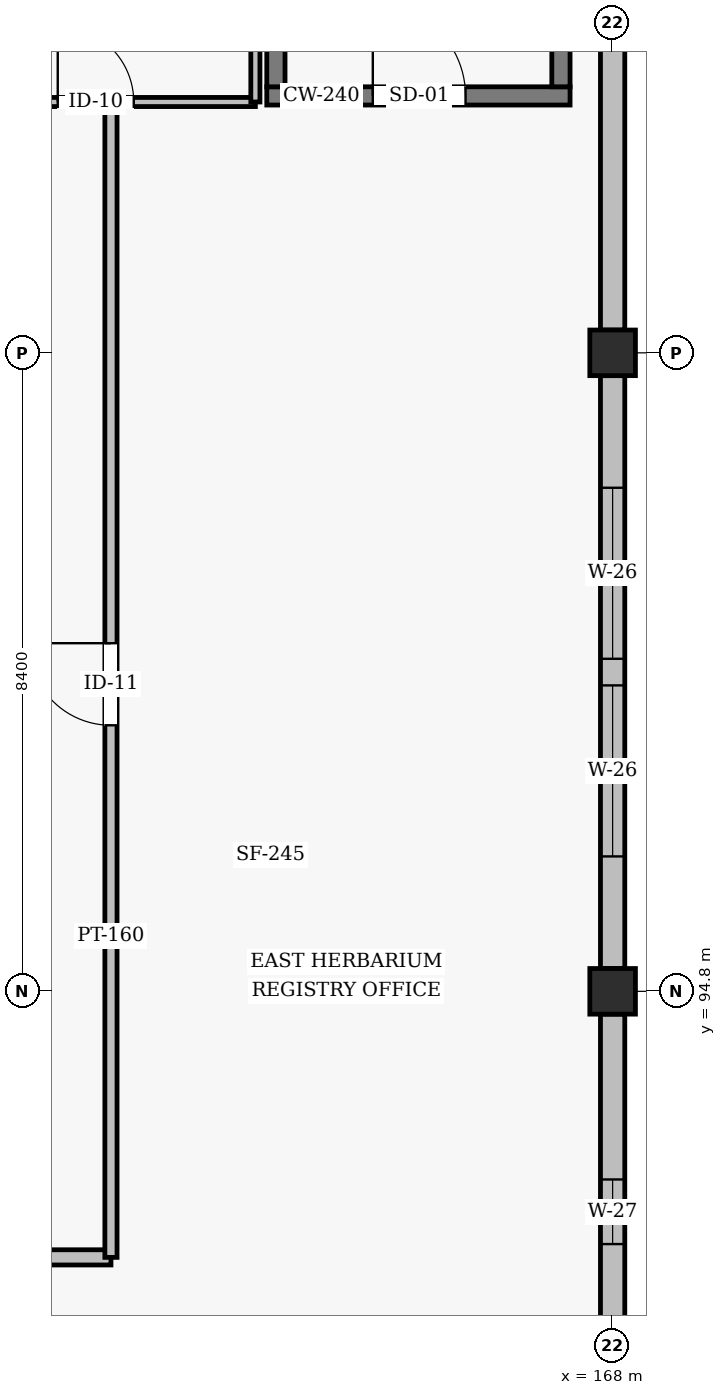
"""IFC4 building model, lengths in metres.
Left out: names, types, materials, properties, quantities, classifications, styles, units other than length and angle.
Written with IfcOpenShell. Run it as: python <this file> out.ifc"""

import sys

from ifc_helpers import new_model, si_unit, direction, frame, frame_2d, origin, origin_2d, place, context, subcontext, project, spatial, rectangle, hollow_rectangle, extrude, element, fill, save


model = new_model("IFC4")
c1 = context("Model", 3, precision=1e-05, world=origin(), true_north=direction((0.0, 1.0)))
c2 = subcontext(c1, "Body", "Model", "MODEL_VIEW")
j1 = project(units=[si_unit("LENGTHUNIT", "METRE"), si_unit("PLANEANGLEUNIT", "RADIAN")], contexts=[c1])
p1 = place(None, origin())
s1 = spatial("IfcSite", under=j1, at=p1, CompositionType="ELEMENT")
p2 = place(p1, origin())
s2 = spatial("IfcBuilding", under=s1, at=p2, CompositionType="ELEMENT")
p3 = place(p2, frame((0.0, 0.0, 9.0)))
s3 = spatial("IfcBuildingStorey", under=s2, at=p3, CompositionType="ELEMENT", Elevation=9.0)
for number, where, z_axis, x_axis in (
    (1, (168.0, 94.8, 0.0), (0.0, 0.0, 1.0), (1.0, 0.0, 0.0)),
    (2, (168.0, 103.2, 0.0), (0.0, 0.0, 1.0), (1.0, 0.0, 0.0)),
):
    element("IfcColumn", number, at=place(p3, frame(where, z_axis=z_axis, x_axis=x_axis)), inside=s3, PredefinedType="COLUMN", context=c2, shape_type="SweptSolid", body=[
        extrude(hollow_rectangle(XDim=0.6, YDim=0.6, WallThickness=0.025, InnerFilletRadius=0.025, OuterFilletRadius=0.05, at=origin_2d()), origin(), (0.0, 0.0, 1.0), 4.2),
    ])
p4 = place(p3, frame((168.0, 86.7, 0.0), z_axis=(0.0, 0.0, 1.0), x_axis=(0.0, 1.0, 0.0)))
e3 = element("IfcWall", 3, at=p4, inside=s3, PredefinedType="SOLIDWALL", context=c2, shape_type="SweptSolid", body=[
    extrude(rectangle(XDim=7.8, YDim=0.32, at=frame_2d((3.9, 0.0))), origin(), (0.0, 0.0, 1.0), 3.435),
])
p5 = place(p4, frame((2.175, 0.0, 1.1)))
e4 = element("IfcOpeningElement", 4, at=p5, cuts=e3, PredefinedType="OPENING", context=c2, shape_type="SweptSolid", body=[
    extrude(rectangle(XDim=0.85, YDim=1.45, at=frame_2d((0.425, 0.725))), frame((0.0, 0.17, 0.0), z_axis=(0.0, -1.0, 0.0), x_axis=(1.0, 0.0, 0.0)), (0.0, 0.0, 1.0), 0.34),
])
p6 = place(p4, frame((4.775, 0.0, 1.1)))
e5 = element("IfcOpeningElement", 5, at=p6, cuts=e3, PredefinedType="OPENING", context=c2, shape_type="SweptSolid", body=[
    extrude(rectangle(XDim=0.85, YDim=1.45, at=frame_2d((0.425, 0.725))), frame((0.0, 0.17, 0.0), z_axis=(0.0, -1.0, 0.0), x_axis=(1.0, 0.0, 0.0)), (0.0, 0.0, 1.0), 0.34),
])
p7 = place(p3, frame((168.0, 95.1, 0.0), z_axis=(0.0, 0.0, 1.0), x_axis=(0.0, 1.0, 0.0)))
e6 = element("IfcWall", 6, at=p7, inside=s3, PredefinedType="SOLIDWALL", context=c2, shape_type="SweptSolid", body=[
    extrude(rectangle(XDim=7.8, YDim=0.32, at=frame_2d((3.9, 0.0))), origin(), (0.0, 0.0, 1.0), 3.435),
])
p8 = place(p7, frame((1.475, 0.0, 0.8)))
e7 = element("IfcOpeningElement", 7, at=p8, cuts=e6, PredefinedType="OPENING", context=c2, shape_type="SweptSolid", body=[
    extrude(rectangle(XDim=2.25, YDim=2.15, at=frame_2d((1.125, 1.075))), frame((0.0, 0.17, 0.0), z_axis=(0.0, -1.0, 0.0), x_axis=(1.0, 0.0, 0.0)), (0.0, 0.0, 1.0), 0.34),
])
p9 = place(p7, frame((4.075, 0.0, 0.8)))
e8 = element("IfcOpeningElement", 8, at=p9, cuts=e6, PredefinedType="OPENING", context=c2, shape_type="SweptSolid", body=[
    extrude(rectangle(XDim=2.25, YDim=2.15, at=frame_2d((1.125, 1.075))), frame((0.0, 0.17, 0.0), z_axis=(0.0, -1.0, 0.0), x_axis=(1.0, 0.0, 0.0)), (0.0, 0.0, 1.0), 0.34),
])
p10 = place(p3, frame((168.0, 103.5, 0.0), z_axis=(0.0, 0.0, 1.0), x_axis=(0.0, 1.0, 0.0)))
e9 = element("IfcWall", 9, at=p10, inside=s3, PredefinedType="SOLIDWALL", context=c2, shape_type="SweptSolid", body=[
    extrude(rectangle(XDim=11.35, YDim=0.32, at=frame_2d((5.675, 0.0))), origin(), (0.0, 0.0, 1.0), 3.143),
])
p11 = place(p3, frame((163.45, 106.58, 0.0), z_axis=(0.0, 0.0, 1.0), x_axis=(1.0, 0.0, 0.0)))
e10 = element("IfcWall", 10, at=p11, inside=s3, PredefinedType="SHEAR", context=c2, shape_type="SweptSolid", body=[
    extrude(rectangle(XDim=3.99, YDim=0.24, at=frame_2d((1.995, 0.0))), origin(), (0.0, 0.0, 1.0), 3.935),
])
p12 = place(p11, frame((1.395, 0.0, 0.0)))
e11 = element("IfcOpeningElement", 11, at=p12, cuts=e10, PredefinedType="OPENING", context=c2, shape_type="SweptSolid", body=[
    extrude(rectangle(XDim=1.22, YDim=2.18, at=frame_2d((0.61, 1.09))), frame((0.0, 0.13, 0.0), z_axis=(0.0, -1.0, 0.0), x_axis=(1.0, 0.0, 0.0)), (0.0, 0.0, 1.0), 0.26),
])
for number, where, z_axis, x_axis in (
    (12, (163.57, 106.7, 0.0), (0.0, 0.0, 1.0), (0.0, 1.0, 0.0)),
    (13, (167.32, 106.7, 0.0), (0.0, 0.0, 1.0), (0.0, 1.0, 0.0)),
):
    element("IfcWall", number, at=place(p3, frame(where, z_axis=z_axis, x_axis=x_axis)), inside=s3, PredefinedType="SHEAR", context=c2, shape_type="SweptSolid", body=[
        extrude(rectangle(XDim=7.9, YDim=0.24, at=frame_2d((3.95, 0.0))), origin(), (0.0, 0.0, 1.0), 3.935),
    ])
p13 = place(p3, frame((148.1, 91.3, 0.0), z_axis=(0.0, 0.0, 1.0), x_axis=(1.0, 0.0, 0.0)))
e14 = element("IfcWall", 14, at=p13, inside=s3, PredefinedType="SOLIDWALL", context=c2, shape_type="SweptSolid", body=[
    extrude(rectangle(XDim=13.3, YDim=0.2, at=frame_2d((6.65, 0.0))), origin(), (0.0, 0.0, 1.0), 3.545),
])
p14 = place(p13, frame((6.05, 0.0, 0.0)))
e15 = element("IfcOpeningElement", 15, at=p14, cuts=e14, PredefinedType="OPENING", context=c2, shape_type="SweptSolid", body=[
    extrude(rectangle(XDim=1.2, YDim=2.08, at=frame_2d((0.6, 1.04))), frame((0.0, 0.11, 0.0), z_axis=(0.0, -1.0, 0.0), x_axis=(1.0, 0.0, 0.0)), (0.0, 0.0, 1.0), 0.22),
])
p15 = place(p3, frame((161.4, 91.3, 0.0), z_axis=(0.0, 0.0, 1.0), x_axis=(0.0, 1.0, 0.0)))
e16 = element("IfcWall", 16, at=p15, inside=s3, PredefinedType="PARTITIONING", context=c2, shape_type="SweptSolid", body=[
    extrude(rectangle(XDim=15.1, YDim=0.16, at=frame_2d((7.55, 0.0))), origin(), (0.0, 0.0, 1.0), 3.285),
])
p16 = place(p15, frame((7.0, 0.0, 0.0)))
e17 = element("IfcOpeningElement", 17, at=p16, cuts=e16, PredefinedType="OPENING", context=c2, shape_type="SweptSolid", body=[
    extrude(rectangle(XDim=1.08, YDim=2.08, at=frame_2d((0.54, 1.04))), frame((0.0, 0.09, 0.0), z_axis=(0.0, -1.0, 0.0), x_axis=(1.0, 0.0, 0.0)), (0.0, 0.0, 1.0), 0.18),
])
p17 = place(p3, frame((159.1, 106.5, 0.0), z_axis=(0.0, 0.0, 1.0), x_axis=(1.0, 0.0, 0.0)))
e18 = element("IfcWall", 18, at=p17, inside=s3, PredefinedType="PARTITIONING", context=c2, shape_type="SweptSolid", body=[
    extrude(rectangle(XDim=4.2, YDim=0.12, at=frame_2d((2.1, 0.0))), origin(), (0.0, 0.0, 1.0), 3.935),
])
p18 = place(p17, frame((1.6, 0.0, 0.0)))
e19 = element("IfcOpeningElement", 19, at=p18, cuts=e18, PredefinedType="OPENING", context=c2, shape_type="SweptSolid", body=[
    extrude(rectangle(XDim=1.0, YDim=2.1, at=frame_2d((0.5, 1.05))), frame((0.0, 0.07, 0.0), z_axis=(0.0, -1.0, 0.0), x_axis=(1.0, 0.0, 0.0)), (0.0, 0.0, 1.0), 0.14),
])
p19 = place(p3, frame((163.3, 106.5, 0.0), z_axis=(0.0, 0.0, 1.0), x_axis=(0.0, 1.0, 0.0)))
e20 = element("IfcWall", 20, at=p19, inside=s3, PredefinedType="PARTITIONING", context=c2, shape_type="SweptSolid", body=[
    extrude(rectangle(XDim=8.3, YDim=0.12, at=frame_2d((4.15, 0.0))), origin(), (0.0, 0.0, 1.0), 3.935),
])
p20 = place(p6, origin())
e21 = element("IfcWindow", 21, at=p20, inside=s3, PartitioningType="SINGLE_PANEL", PredefinedType="WINDOW", context=c2, shape_type="SweptSolid", body=[
    extrude(rectangle(XDim=0.85, YDim=1.45, at=frame_2d((0.425, 0.725))), frame((0.0, 0.03, 0.0), z_axis=(0.0, -1.0, 0.0), x_axis=(1.0, 0.0, 0.0)), (0.0, 0.0, 1.0), 0.06),
])
fill(e5, e21)
p21 = place(p8, origin())
e22 = element("IfcWindow", 22, at=p21, inside=s3, PartitioningType="SINGLE_PANEL", PredefinedType="WINDOW", context=c2, shape_type="SweptSolid", body=[
    extrude(rectangle(XDim=2.25, YDim=2.15, at=frame_2d((1.125, 1.075))), frame((0.0, 0.03, 0.0), z_axis=(0.0, -1.0, 0.0), x_axis=(1.0, 0.0, 0.0)), (0.0, 0.0, 1.0), 0.06),
])
fill(e7, e22)
p22 = place(p9, origin())
e23 = element("IfcWindow", 23, at=p22, inside=s3, PartitioningType="SINGLE_PANEL", PredefinedType="WINDOW", context=c2, shape_type="SweptSolid", body=[
    extrude(rectangle(XDim=2.25, YDim=2.15, at=frame_2d((1.125, 1.075))), frame((0.0, 0.03, 0.0), z_axis=(0.0, -1.0, 0.0), x_axis=(1.0, 0.0, 0.0)), (0.0, 0.0, 1.0), 0.06),
])
fill(e8, e23)
p23 = place(p12, origin())
e24 = element("IfcDoor", 24, at=p23, inside=s3, OperationType="SINGLE_SWING_LEFT", PredefinedType="DOOR", context=c2, shape_type="SweptSolid", body=[
    extrude(rectangle(XDim=1.22, YDim=2.18, at=frame_2d((0.61, 1.09))), frame((0.0, 0.025, 0.0), z_axis=(0.0, -1.0, 0.0), x_axis=(1.0, 0.0, 0.0)), (0.0, 0.0, 1.0), 0.05),
])
fill(e11, e24)
p24 = place(p16, origin())
e25 = element("IfcDoor", 25, at=p24, inside=s3, OperationType="SINGLE_SWING_RIGHT", PredefinedType="DOOR", context=c2, shape_type="SweptSolid", body=[
    extrude(rectangle(XDim=1.08, YDim=2.08, at=frame_2d((0.54, 1.04))), frame((0.0, 0.025, 0.0), z_axis=(0.0, -1.0, 0.0), x_axis=(1.0, 0.0, 0.0)), (0.0, 0.0, 1.0), 0.05),
])
fill(e17, e25)
p25 = place(p18, origin())
e26 = element("IfcDoor", 26, at=p25, inside=s3, OperationType="SINGLE_SWING_LEFT", PredefinedType="DOOR", context=c2, shape_type="SweptSolid", body=[
    extrude(rectangle(XDim=1.0, YDim=2.1, at=frame_2d((0.5, 1.05))), frame((0.0, 0.025, 0.0), z_axis=(0.0, -1.0, 0.0), x_axis=(1.0, 0.0, 0.0)), (0.0, 0.0, 1.0), 0.05),
])
fill(e19, e26)
save(model, sys.argv[1])
